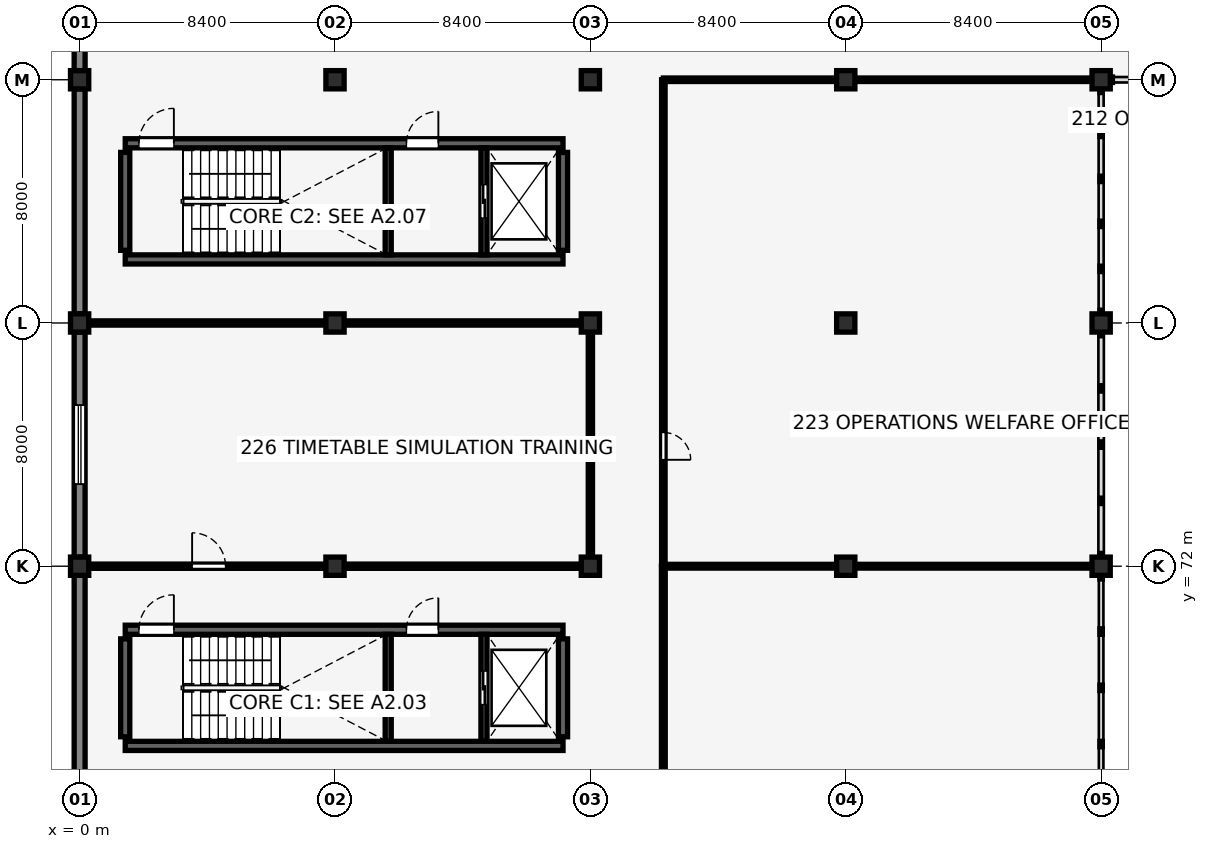
"""IFC4 building model, lengths in metres.
Left out: names, types, materials, properties, quantities, classifications, styles, units other than length and angle.
Written with IfcOpenShell. Run it as: python <this file> out.ifc"""

import sys

from ifc_helpers import new_model, si_unit, direction, frame, frame_2d, origin, origin_2d, place, context, subcontext, project, spatial, rectangle, extrude, element, fill, save


model = new_model("IFC4")
c1 = context("Model", 3, precision=1e-05, world=origin(), true_north=direction((0.0, 1.0)))
c2 = subcontext(c1, "Body", "Model", "MODEL_VIEW")
j1 = project(units=[si_unit("LENGTHUNIT", "METRE"), si_unit("PLANEANGLEUNIT", "RADIAN")], contexts=[c1])
p1 = place(None, origin())
s1 = spatial("IfcSite", under=j1, at=p1, CompositionType="ELEMENT")
p2 = place(p1, origin())
s2 = spatial("IfcBuilding", under=s1, at=p2, CompositionType="ELEMENT")
p3 = place(p2, frame((0.0, 0.0, 9.52)))
s3 = spatial("IfcBuildingStorey", under=s2, at=p3, CompositionType="ELEMENT", Elevation=9.52)
p4 = place(p3, frame((1.5, 66.09, 0.0), z_axis=(0.0, 0.0, 1.0), x_axis=(1.0, 0.0, 0.0)))
e1 = element("IfcWall", 1, at=p4, inside=s3, PredefinedType="SHEAR", context=c2, shape_type="SweptSolid", body=[
    extrude(rectangle(XDim=14.4, YDim=0.3, at=frame_2d((7.2, 0.0))), origin(), (0.0, 0.0, 1.0), 3.57),
])
p5 = place(p3, frame((1.5, 69.91, 0.0), z_axis=(0.0, 0.0, 1.0), x_axis=(1.0, 0.0, 0.0)))
e2 = element("IfcWall", 2, at=p5, inside=s3, PredefinedType="SHEAR", context=c2, shape_type="SweptSolid", body=[
    extrude(rectangle(XDim=14.4, YDim=0.3, at=frame_2d((7.2, 0.0))), origin(), (0.0, 0.0, 1.0), 3.57),
])
p6 = place(p5, frame((0.45, 0.0, 0.0), z_axis=(0.0, 0.0, 1.0), x_axis=(1.0, 0.0, 0.0)))
e3 = element("IfcOpeningElement", 3, at=p6, cuts=e2, PredefinedType="OPENING", context=c2, shape_type="SweptSolid", body=[
    extrude(rectangle(XDim=1.15, YDim=2.15, at=frame_2d((0.575, 1.075))), frame((0.0, 0.16, 0.0), z_axis=(0.0, -1.0, 0.0), x_axis=(1.0, 0.0, 0.0)), (0.0, 0.0, 1.0), 0.32),
])
p7 = place(p5, frame((9.25, 0.0, 0.0), z_axis=(0.0, 0.0, 1.0), x_axis=(1.0, 0.0, 0.0)))
e4 = element("IfcOpeningElement", 4, at=p7, cuts=e2, PredefinedType="OPENING", context=c2, shape_type="SweptSolid", body=[
    extrude(rectangle(XDim=1.05, YDim=2.15, at=frame_2d((0.525, 1.075))), frame((0.0, 0.16, 0.0), z_axis=(0.0, -1.0, 0.0), x_axis=(1.0, 0.0, 0.0)), (0.0, 0.0, 1.0), 0.32),
])
for number, where, z_axis, x_axis in (
    (5, (1.5, 66.39, 0.0), (0.0, 0.0, 1.0), (0.0, 1.0, 0.0)),
    (6, (15.9, 66.39, 0.0), (0.0, 0.0, 1.0), (0.0, 1.0, 0.0)),
):
    element("IfcWall", number, at=place(p3, frame(where, z_axis=z_axis, x_axis=x_axis)), inside=s3, PredefinedType="SHEAR", context=c2, shape_type="SweptSolid", body=[
        extrude(rectangle(XDim=3.22, YDim=0.3, at=frame_2d((1.61, 0.0))), origin(), (0.0, 0.0, 1.0), 3.57),
    ])
p8 = place(p3, frame((1.5, 82.09, 0.0), z_axis=(0.0, 0.0, 1.0), x_axis=(1.0, 0.0, 0.0)))
e7 = element("IfcWall", 7, at=p8, inside=s3, PredefinedType="SHEAR", context=c2, shape_type="SweptSolid", body=[
    extrude(rectangle(XDim=14.4, YDim=0.3, at=frame_2d((7.2, 0.0))), origin(), (0.0, 0.0, 1.0), 3.57),
])
p9 = place(p3, frame((1.5, 85.91, 0.0), z_axis=(0.0, 0.0, 1.0), x_axis=(1.0, 0.0, 0.0)))
e8 = element("IfcWall", 8, at=p9, inside=s3, PredefinedType="SHEAR", context=c2, shape_type="SweptSolid", body=[
    extrude(rectangle(XDim=14.4, YDim=0.3, at=frame_2d((7.2, 0.0))), origin(), (0.0, 0.0, 1.0), 3.57),
])
p10 = place(p9, frame((0.45, 0.0, 0.0), z_axis=(0.0, 0.0, 1.0), x_axis=(1.0, 0.0, 0.0)))
e9 = element("IfcOpeningElement", 9, at=p10, cuts=e8, PredefinedType="OPENING", context=c2, shape_type="SweptSolid", body=[
    extrude(rectangle(XDim=1.15, YDim=2.15, at=frame_2d((0.575, 1.075))), frame((0.0, 0.16, 0.0), z_axis=(0.0, -1.0, 0.0), x_axis=(1.0, 0.0, 0.0)), (0.0, 0.0, 1.0), 0.32),
])
p11 = place(p9, frame((9.25, 0.0, 0.0), z_axis=(0.0, 0.0, 1.0), x_axis=(1.0, 0.0, 0.0)))
e10 = element("IfcOpeningElement", 10, at=p11, cuts=e8, PredefinedType="OPENING", context=c2, shape_type="SweptSolid", body=[
    extrude(rectangle(XDim=1.05, YDim=2.15, at=frame_2d((0.525, 1.075))), frame((0.0, 0.16, 0.0), z_axis=(0.0, -1.0, 0.0), x_axis=(1.0, 0.0, 0.0)), (0.0, 0.0, 1.0), 0.32),
])
for number, where, z_axis, x_axis in (
    (11, (1.5, 82.39, 0.0), (0.0, 0.0, 1.0), (0.0, 1.0, 0.0)),
    (12, (15.9, 82.39, 0.0), (0.0, 0.0, 1.0), (0.0, 1.0, 0.0)),
):
    element("IfcWall", number, at=place(p3, frame(where, z_axis=z_axis, x_axis=x_axis)), inside=s3, PredefinedType="SHEAR", context=c2, shape_type="SweptSolid", body=[
        extrude(rectangle(XDim=3.22, YDim=0.3, at=frame_2d((1.61, 0.0))), origin(), (0.0, 0.0, 1.0), 3.57),
    ])
for number, where, z_axis, x_axis in (
    (13, (0.0, 72.0, 0.0), (0.0, 0.0, 1.0), (1.0, 0.0, 0.0)),
    (14, (0.0, 80.0, 0.0), (0.0, 0.0, 1.0), (1.0, 0.0, 0.0)),
    (15, (0.0, 88.0, 0.0), (0.0, 0.0, 1.0), (1.0, 0.0, 0.0)),
    (16, (8.4, 72.0, 0.0), (0.0, 0.0, 1.0), (1.0, 0.0, 0.0)),
    (17, (8.4, 80.0, 0.0), (0.0, 0.0, 1.0), (1.0, 0.0, 0.0)),
    (18, (8.4, 88.0, 0.0), (0.0, 0.0, 1.0), (1.0, 0.0, 0.0)),
    (19, (16.8, 72.0, 0.0), (0.0, 0.0, 1.0), (1.0, 0.0, 0.0)),
    (20, (16.8, 80.0, 0.0), (0.0, 0.0, 1.0), (1.0, 0.0, 0.0)),
    (21, (16.8, 88.0, 0.0), (0.0, 0.0, 1.0), (1.0, 0.0, 0.0)),
    (22, (25.2, 72.0, 0.0), (0.0, 0.0, 1.0), (1.0, 0.0, 0.0)),
    (23, (25.2, 80.0, 0.0), (0.0, 0.0, 1.0), (1.0, 0.0, 0.0)),
    (24, (25.2, 88.0, 0.0), (0.0, 0.0, 1.0), (1.0, 0.0, 0.0)),
    (25, (33.6, 72.0, 0.0), (0.0, 0.0, 1.0), (1.0, 0.0, 0.0)),
    (26, (33.6, 80.0, 0.0), (0.0, 0.0, 1.0), (1.0, 0.0, 0.0)),
    (27, (33.6, 88.0, 0.0), (0.0, 0.0, 1.0), (1.0, 0.0, 0.0)),
):
    element("IfcColumn", number, at=place(p3, frame(where, z_axis=z_axis, x_axis=x_axis)), inside=s3, PredefinedType="COLUMN", context=c2, shape_type="SweptSolid", body=[
        extrude(rectangle(XDim=0.6, YDim=0.6, at=origin_2d()), origin(), (0.0, 0.0, 1.0), 3.57),
    ])
p12 = place(p3, frame((0.0, 64.3, 0.0), z_axis=(0.0, 0.0, 1.0), x_axis=(0.0, 1.0, 0.0)))
e28 = element("IfcWall", 28, at=p12, inside=s3, PredefinedType="SOLIDWALL", context=c2, shape_type="SweptSolid", body=[
    extrude(rectangle(XDim=7.4, YDim=0.36, at=frame_2d((3.7, 0.0))), origin(), (0.0, 0.0, 1.0), 3.27),
])
p13 = place(p3, frame((0.0, 72.3, 0.0), z_axis=(0.0, 0.0, 1.0), x_axis=(0.0, 1.0, 0.0)))
e29 = element("IfcWall", 29, at=p13, inside=s3, PredefinedType="SOLIDWALL", context=c2, shape_type="SweptSolid", body=[
    extrude(rectangle(XDim=7.4, YDim=0.36, at=frame_2d((3.7, 0.0))), origin(), (0.0, 0.0, 1.0), 3.219),
])
p14 = place(p13, frame((2.4, 0.0, 1.55), z_axis=(0.0, 0.0, 1.0), x_axis=(1.0, 0.0, 0.0)))
e30 = element("IfcOpeningElement", 30, at=p14, cuts=e29, PredefinedType="OPENING", context=c2, shape_type="SweptSolid", body=[
    extrude(rectangle(XDim=2.6, YDim=0.85, at=frame_2d((1.3, 0.425))), frame((0.0, 0.19, 0.0), z_axis=(0.0, -1.0, 0.0), x_axis=(1.0, 0.0, 0.0)), (0.0, 0.0, 1.0), 0.38),
])
p15 = place(p3, frame((0.0, 80.3, 0.0), z_axis=(0.0, 0.0, 1.0), x_axis=(0.0, 1.0, 0.0)))
e31 = element("IfcWall", 31, at=p15, inside=s3, PredefinedType="SOLIDWALL", context=c2, shape_type="SweptSolid", body=[
    extrude(rectangle(XDim=7.4, YDim=0.36, at=frame_2d((3.7, 0.0))), origin(), (0.0, 0.0, 1.0), 3.27),
])
p16 = place(p3, frame((0.0, 88.3, 0.0), z_axis=(0.0, 0.0, 1.0), x_axis=(0.0, 1.0, 0.0)))
e32 = element("IfcWall", 32, at=p16, inside=s3, PredefinedType="SOLIDWALL", context=c2, shape_type="SweptSolid", body=[
    extrude(rectangle(XDim=7.4, YDim=0.36, at=frame_2d((3.7, 0.0))), origin(), (0.0, 0.0, 1.0), 3.219),
])
p17 = place(p16, frame((2.65, 0.0, 1.55), z_axis=(0.0, 0.0, 1.0), x_axis=(1.0, 0.0, 0.0)))
e33 = element("IfcOpeningElement", 33, at=p17, cuts=e32, PredefinedType="OPENING", context=c2, shape_type="SweptSolid", body=[
    extrude(rectangle(XDim=2.1, YDim=0.8, at=frame_2d((1.05, 0.4))), frame((0.0, 0.19, 0.0), z_axis=(0.0, -1.0, 0.0), x_axis=(1.0, 0.0, 0.0)), (0.0, 0.0, 1.0), 0.38),
])
p18 = place(p3, frame((10.15, 66.24, 0.0), z_axis=(0.0, 0.0, 1.0), x_axis=(0.0, 1.0, 0.0)))
e34 = element("IfcWall", 34, at=p18, inside=s3, PredefinedType="SHEAR", context=c2, shape_type="SweptSolid", body=[
    extrude(rectangle(XDim=3.52, YDim=0.2, at=frame_2d((1.76, 0.0))), origin(), (0.0, 0.0, 1.0), 3.57),
])
p19 = place(p3, frame((13.3, 66.24, 0.0), z_axis=(0.0, 0.0, 1.0), x_axis=(0.0, 1.0, 0.0)))
e35 = element("IfcWall", 35, at=p19, inside=s3, PredefinedType="SHEAR", context=c2, shape_type="SweptSolid", body=[
    extrude(rectangle(XDim=3.52, YDim=0.2, at=frame_2d((1.76, 0.0))), origin(), (0.0, 0.0, 1.0), 3.57),
])
p20 = place(p19, frame((1.21, 0.0, 0.0), z_axis=(0.0, 0.0, 1.0), x_axis=(1.0, 0.0, 0.0)))
e36 = element("IfcOpeningElement", 36, at=p20, cuts=e35, PredefinedType="OPENING", context=c2, shape_type="SweptSolid", body=[
    extrude(rectangle(XDim=1.1, YDim=2.15, at=frame_2d((0.55, 1.075))), frame((0.0, 0.11, 0.0), z_axis=(0.0, -1.0, 0.0), x_axis=(1.0, 0.0, 0.0)), (0.0, 0.0, 1.0), 0.22),
])
p21 = place(p3, frame((10.15, 82.24, 0.0), z_axis=(0.0, 0.0, 1.0), x_axis=(0.0, 1.0, 0.0)))
e37 = element("IfcWall", 37, at=p21, inside=s3, PredefinedType="SHEAR", context=c2, shape_type="SweptSolid", body=[
    extrude(rectangle(XDim=3.52, YDim=0.2, at=frame_2d((1.76, 0.0))), origin(), (0.0, 0.0, 1.0), 3.57),
])
p22 = place(p3, frame((13.3, 82.24, 0.0), z_axis=(0.0, 0.0, 1.0), x_axis=(0.0, 1.0, 0.0)))
e38 = element("IfcWall", 38, at=p22, inside=s3, PredefinedType="SHEAR", context=c2, shape_type="SweptSolid", body=[
    extrude(rectangle(XDim=3.52, YDim=0.2, at=frame_2d((1.76, 0.0))), origin(), (0.0, 0.0, 1.0), 3.57),
])
p23 = place(p22, frame((1.21, 0.0, 0.0), z_axis=(0.0, 0.0, 1.0), x_axis=(1.0, 0.0, 0.0)))
e39 = element("IfcOpeningElement", 39, at=p23, cuts=e38, PredefinedType="OPENING", context=c2, shape_type="SweptSolid", body=[
    extrude(rectangle(XDim=1.1, YDim=2.15, at=frame_2d((0.55, 1.075))), frame((0.0, 0.11, 0.0), z_axis=(0.0, -1.0, 0.0), x_axis=(1.0, 0.0, 0.0)), (0.0, 0.0, 1.0), 0.22),
])
p24 = place(p3, frame((0.29, 72.0, 0.0), z_axis=(0.0, 0.0, 1.0), x_axis=(1.0, 0.0, 0.0)))
e40 = element("IfcWall", 40, at=p24, inside=s3, PredefinedType="PARTITIONING", context=c2, shape_type="SweptSolid", body=[
    extrude(rectangle(XDim=7.82, YDim=0.14, at=frame_2d((3.91, 0.0))), origin(), (0.0, 0.0, 1.0), 3.037),
])
p25 = place(p24, frame((3.41, 0.0, 0.0), z_axis=(0.0, 0.0, 1.0), x_axis=(1.0, 0.0, 0.0)))
e41 = element("IfcOpeningElement", 41, at=p25, cuts=e40, PredefinedType="OPENING", context=c2, shape_type="SweptSolid", body=[
    extrude(rectangle(XDim=1.1, YDim=2.2, at=frame_2d((0.55, 1.1))), frame((0.0, 0.08, 0.0), z_axis=(0.0, -1.0, 0.0), x_axis=(1.0, 0.0, 0.0)), (0.0, 0.0, 1.0), 0.16),
])
p26 = place(p3, frame((19.2, 48.04, 0.0), z_axis=(0.0, 0.0, 1.0), x_axis=(0.0, 1.0, 0.0)))
e42 = element("IfcWall", 42, at=p26, inside=s3, PredefinedType="PARTITIONING", context=c2, shape_type="SweptSolid", body=[
    extrude(rectangle(XDim=23.96, YDim=0.125, at=frame_2d((11.98, 0.0))), origin(), (0.0, 0.0, 1.0), 3.57),
])
p27 = place(p26, frame((4.38, 0.0, 0.0), z_axis=(0.0, 0.0, 1.0), x_axis=(-1.0, 0.0, 0.0)))
e43 = element("IfcOpeningElement", 43, at=p27, cuts=e42, PredefinedType="OPENING", context=c2, shape_type="SweptSolid", body=[
    extrude(rectangle(XDim=0.92, YDim=2.12, at=frame_2d((0.46, 1.06))), frame((0.0, 0.073, 0.0), z_axis=(0.0, -1.0, 0.0), x_axis=(1.0, 0.0, 0.0)), (0.0, 0.0, 1.0), 0.145),
])
p28 = place(p3, frame((19.2, 72.0, 0.0), z_axis=(0.0, 0.0, 1.0), x_axis=(0.0, 1.0, 0.0)))
e44 = element("IfcWall", 44, at=p28, inside=s3, PredefinedType="PARTITIONING", context=c2, shape_type="SweptSolid", body=[
    extrude(rectangle(XDim=16.0, YDim=0.115, at=frame_2d((8.0, 0.0))), origin(), (0.0, 0.0, 1.0), 3.57),
])
p29 = place(p28, frame((4.4, 0.0, 0.0), z_axis=(0.0, 0.0, 1.0), x_axis=(-1.0, 0.0, 0.0)))
e45 = element("IfcOpeningElement", 45, at=p29, cuts=e44, PredefinedType="OPENING", context=c2, shape_type="SweptSolid", body=[
    extrude(rectangle(XDim=0.9, YDim=2.1, at=frame_2d((0.45, 1.05))), frame((0.0, 0.067, 0.0), z_axis=(0.0, -1.0, 0.0), x_axis=(1.0, 0.0, 0.0)), (0.0, 0.0, 1.0), 0.135),
])
for number, where, z_axis, x_axis in (
    (46, (8.69, 72.0, 0.0), (0.0, 0.0, 1.0), (1.0, 0.0, 0.0)),
    (47, (0.29, 80.0, 0.0), (0.0, 0.0, 1.0), (1.0, 0.0, 0.0)),
    (48, (8.69, 80.0, 0.0), (0.0, 0.0, 1.0), (1.0, 0.0, 0.0)),
):
    element("IfcWall", number, at=place(p3, frame(where, z_axis=z_axis, x_axis=x_axis)), inside=s3, PredefinedType="PARTITIONING", context=c2, shape_type="SweptSolid", body=[
        extrude(rectangle(XDim=7.82, YDim=0.14, at=frame_2d((3.91, 0.0))), origin(), (0.0, 0.0, 1.0), 3.037),
    ])
p30 = place(p3, frame((16.8, 72.29, 0.0), z_axis=(0.0, 0.0, 1.0), x_axis=(0.0, 1.0, 0.0)))
e49 = element("IfcWall", 49, at=p30, inside=s3, PredefinedType="PARTITIONING", context=c2, shape_type="SweptSolid", body=[
    extrude(rectangle(XDim=7.42, YDim=0.14, at=frame_2d((3.71, 0.0))), origin(), (0.0, 0.0, 1.0), 3.107),
])
p31 = place(p3, frame((19.2, 72.0, 0.0), z_axis=(0.0, 0.0, 1.0), x_axis=(1.0, 0.0, 0.0)))
e50 = element("IfcWall", 50, at=p31, inside=s3, PredefinedType="PARTITIONING", context=c2, shape_type="SweptSolid", body=[
    extrude(rectangle(XDim=5.71, YDim=0.125, at=frame_2d((2.855, 0.0))), origin(), (0.0, 0.0, 1.0), 3.037),
])
p32 = place(p3, frame((25.49, 72.0, 0.0), z_axis=(0.0, 0.0, 1.0), x_axis=(1.0, 0.0, 0.0)))
e51 = element("IfcWall", 51, at=p32, inside=s3, PredefinedType="PARTITIONING", context=c2, shape_type="SweptSolid", body=[
    extrude(rectangle(XDim=7.82, YDim=0.125, at=frame_2d((3.91, 0.0))), origin(), (0.0, 0.0, 1.0), 3.037),
])
p33 = place(p3, frame((19.2, 88.0, 0.0), z_axis=(0.0, 0.0, 1.0), x_axis=(1.0, 0.0, 0.0)))
e52 = element("IfcWall", 52, at=p33, inside=s3, PredefinedType="PARTITIONING", context=c2, shape_type="SweptSolid", body=[
    extrude(rectangle(XDim=5.71, YDim=0.115, at=frame_2d((2.855, 0.0))), origin(), (0.0, 0.0, 1.0), 3.037),
])
p34 = place(p3, frame((25.49, 88.0, 0.0), z_axis=(0.0, 0.0, 1.0), x_axis=(1.0, 0.0, 0.0)))
e53 = element("IfcWall", 53, at=p34, inside=s3, PredefinedType="PARTITIONING", context=c2, shape_type="SweptSolid", body=[
    extrude(rectangle(XDim=7.82, YDim=0.115, at=frame_2d((3.91, 0.0))), origin(), (0.0, 0.0, 1.0), 3.037),
])
p35 = place(p14, origin())
e54 = element("IfcWindow", 54, at=p35, inside=s3, PartitioningType="DOUBLE_PANEL_HORIZONTAL", PredefinedType="WINDOW", context=c2, shape_type="SweptSolid", body=[
    extrude(rectangle(XDim=2.6, YDim=0.85, at=frame_2d((1.3, 0.425))), frame((0.0, 0.03, 0.0), z_axis=(0.0, -1.0, 0.0), x_axis=(1.0, 0.0, 0.0)), (0.0, 0.0, 1.0), 0.06),
])
fill(e30, e54)
p36 = place(p6, origin())
e55 = element("IfcDoor", 55, at=p36, inside=s3, OperationType="SINGLE_SWING_RIGHT", PredefinedType="DOOR", context=c2, shape_type="SweptSolid", body=[
    extrude(rectangle(XDim=1.15, YDim=2.15, at=frame_2d((0.575, 1.075))), frame((0.0, 0.025, 0.0), z_axis=(0.0, -1.0, 0.0), x_axis=(1.0, 0.0, 0.0)), (0.0, 0.0, 1.0), 0.05),
])
fill(e3, e55)
p37 = place(p7, origin())
e56 = element("IfcDoor", 56, at=p37, inside=s3, OperationType="SINGLE_SWING_RIGHT", PredefinedType="DOOR", context=c2, shape_type="SweptSolid", body=[
    extrude(rectangle(XDim=1.05, YDim=2.15, at=frame_2d((0.525, 1.075))), frame((0.0, 0.025, 0.0), z_axis=(0.0, -1.0, 0.0), x_axis=(1.0, 0.0, 0.0)), (0.0, 0.0, 1.0), 0.05),
])
fill(e4, e56)
p38 = place(p20, origin())
e57 = element("IfcDoor", 57, at=p38, inside=s3, OperationType="DOUBLE_DOOR_SLIDING", PredefinedType="DOOR", context=c2, shape_type="SweptSolid", body=[
    extrude(rectangle(XDim=1.1, YDim=2.15, at=frame_2d((0.55, 1.075))), frame((0.0, 0.025, 0.0), z_axis=(0.0, -1.0, 0.0), x_axis=(1.0, 0.0, 0.0)), (0.0, 0.0, 1.0), 0.05),
])
fill(e36, e57)
p39 = place(p10, origin())
e58 = element("IfcDoor", 58, at=p39, inside=s3, OperationType="SINGLE_SWING_RIGHT", PredefinedType="DOOR", context=c2, shape_type="SweptSolid", body=[
    extrude(rectangle(XDim=1.15, YDim=2.15, at=frame_2d((0.575, 1.075))), frame((0.0, 0.025, 0.0), z_axis=(0.0, -1.0, 0.0), x_axis=(1.0, 0.0, 0.0)), (0.0, 0.0, 1.0), 0.05),
])
fill(e9, e58)
p40 = place(p11, origin())
e59 = element("IfcDoor", 59, at=p40, inside=s3, OperationType="SINGLE_SWING_RIGHT", PredefinedType="DOOR", context=c2, shape_type="SweptSolid", body=[
    extrude(rectangle(XDim=1.05, YDim=2.15, at=frame_2d((0.525, 1.075))), frame((0.0, 0.025, 0.0), z_axis=(0.0, -1.0, 0.0), x_axis=(1.0, 0.0, 0.0)), (0.0, 0.0, 1.0), 0.05),
])
fill(e10, e59)
p41 = place(p23, origin())
e60 = element("IfcDoor", 60, at=p41, inside=s3, OperationType="DOUBLE_DOOR_SLIDING", PredefinedType="DOOR", context=c2, shape_type="SweptSolid", body=[
    extrude(rectangle(XDim=1.1, YDim=2.15, at=frame_2d((0.55, 1.075))), frame((0.0, 0.025, 0.0), z_axis=(0.0, -1.0, 0.0), x_axis=(1.0, 0.0, 0.0)), (0.0, 0.0, 1.0), 0.05),
])
fill(e39, e60)
p42 = place(p25, origin())
e61 = element("IfcDoor", 61, at=p42, inside=s3, OperationType="SINGLE_SWING_LEFT", PredefinedType="DOOR", context=c2, shape_type="SweptSolid", body=[
    extrude(rectangle(XDim=1.1, YDim=2.2, at=frame_2d((0.55, 1.1))), frame((0.0, 0.025, 0.0), z_axis=(0.0, -1.0, 0.0), x_axis=(1.0, 0.0, 0.0)), (0.0, 0.0, 1.0), 0.05),
])
fill(e41, e61)
p43 = place(p29, origin())
e62 = element("IfcDoor", 62, at=p43, inside=s3, OperationType="SINGLE_SWING_RIGHT", PredefinedType="DOOR", context=c2, shape_type="SweptSolid", body=[
    extrude(rectangle(XDim=0.9, YDim=2.1, at=frame_2d((0.45, 1.05))), frame((0.0, 0.025, 0.0), z_axis=(0.0, -1.0, 0.0), x_axis=(1.0, 0.0, 0.0)), (0.0, 0.0, 1.0), 0.05),
])
fill(e45, e62)
save(model, sys.argv[1])
